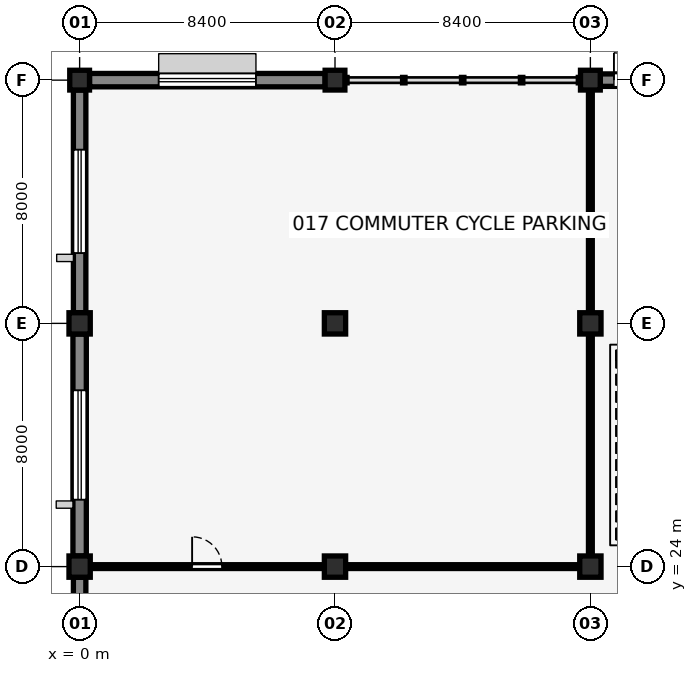
"""IFC4 building model, lengths in metres.
Left out: names, types, materials, properties, quantities, classifications, styles, units other than length and angle.
Written with IfcOpenShell. Run it as: python <this file> out.ifc"""

import sys

from ifc_helpers import new_model, si_unit, direction, frame, frame_2d, origin, origin_2d, place, context, subcontext, project, spatial, rectangle, extrude, element, fill, save


model = new_model("IFC4")
c1 = context("Model", 3, precision=1e-05, world=origin(), true_north=direction((0.0, 1.0)))
c2 = subcontext(c1, "Body", "Model", "MODEL_VIEW")
j1 = project(units=[si_unit("LENGTHUNIT", "METRE"), si_unit("PLANEANGLEUNIT", "RADIAN")], contexts=[c1])
p1 = place(None, origin())
s1 = spatial("IfcSite", under=j1, at=p1, CompositionType="ELEMENT")
p2 = place(p1, origin())
s2 = spatial("IfcBuilding", under=s1, at=p2, CompositionType="ELEMENT")
p3 = place(p2, origin())
s3 = spatial("IfcBuildingStorey", under=s2, at=p3, CompositionType="ELEMENT", Elevation=0.0)
for number, where, z_axis, x_axis in (
    (1, (0.0, 24.0, 0.0), (0.0, 0.0, 1.0), (1.0, 0.0, 0.0)),
    (2, (0.0, 32.0, 0.0), (0.0, 0.0, 1.0), (1.0, 0.0, 0.0)),
):
    element("IfcColumn", number, at=place(p3, frame(where, z_axis=z_axis, x_axis=x_axis)), inside=s3, PredefinedType="COLUMN", context=c2, shape_type="SweptSolid", body=[
        extrude(rectangle(XDim=0.7, YDim=0.7, at=origin_2d()), origin(), (0.0, 0.0, 1.0), 5.15),
    ])
p4 = place(p3, frame((0.0, 40.0, 0.0), z_axis=(0.0, 0.0, 1.0), x_axis=(1.0, 0.0, 0.0)))
e3 = element("IfcColumn", 3, at=p4, inside=s3, PredefinedType="COLUMN", context=c2, shape_type="SweptSolid", body=[
    extrude(rectangle(XDim=0.65, YDim=0.65, at=origin_2d()), origin(), (0.0, 0.0, 1.0), 5.15),
])
for number, where, z_axis, x_axis in (
    (4, (8.4, 24.0, 0.0), (0.0, 0.0, 1.0), (1.0, 0.0, 0.0)),
    (5, (8.4, 32.0, 0.0), (0.0, 0.0, 1.0), (1.0, 0.0, 0.0)),
):
    element("IfcColumn", number, at=place(p3, frame(where, z_axis=z_axis, x_axis=x_axis)), inside=s3, PredefinedType="COLUMN", context=c2, shape_type="SweptSolid", body=[
        extrude(rectangle(XDim=0.7, YDim=0.7, at=origin_2d()), origin(), (0.0, 0.0, 1.0), 5.15),
    ])
p5 = place(p3, frame((8.4, 40.0, 0.0), z_axis=(0.0, 0.0, 1.0), x_axis=(1.0, 0.0, 0.0)))
e6 = element("IfcColumn", 6, at=p5, inside=s3, PredefinedType="COLUMN", context=c2, shape_type="SweptSolid", body=[
    extrude(rectangle(XDim=0.65, YDim=0.65, at=origin_2d()), origin(), (0.0, 0.0, 1.0), 5.15),
])
for number, where, z_axis, x_axis in (
    (7, (16.8, 24.0, 0.0), (0.0, 0.0, 1.0), (1.0, 0.0, 0.0)),
    (8, (16.8, 32.0, 0.0), (0.0, 0.0, 1.0), (1.0, 0.0, 0.0)),
):
    element("IfcColumn", number, at=place(p3, frame(where, z_axis=z_axis, x_axis=x_axis)), inside=s3, PredefinedType="COLUMN", context=c2, shape_type="SweptSolid", body=[
        extrude(rectangle(XDim=0.7, YDim=0.7, at=origin_2d()), origin(), (0.0, 0.0, 1.0), 5.15),
    ])
p6 = place(p3, frame((16.8, 40.0, 0.0), z_axis=(0.0, 0.0, 1.0), x_axis=(1.0, 0.0, 0.0)))
e9 = element("IfcColumn", 9, at=p6, inside=s3, PredefinedType="COLUMN", context=c2, shape_type="SweptSolid", body=[
    extrude(rectangle(XDim=0.65, YDim=0.65, at=origin_2d()), origin(), (0.0, 0.0, 1.0), 5.15),
])
p7 = place(p3, frame((0.0, 16.35, 0.0), z_axis=(0.0, 0.0, 1.0), x_axis=(0.0, 1.0, 0.0)))
e10 = element("IfcWall", 10, at=p7, inside=s3, PredefinedType="SOLIDWALL", context=c2, shape_type="SweptSolid", body=[
    extrude(rectangle(XDim=7.3, YDim=0.41, at=frame_2d((3.65, 0.0))), origin(), (0.0, 0.0, 1.0), 4.85),
])
p8 = place(p3, frame((0.0, 24.35, 0.0), z_axis=(0.0, 0.0, 1.0), x_axis=(0.0, 1.0, 0.0)))
e11 = element("IfcWall", 11, at=p8, inside=s3, PredefinedType="SOLIDWALL", context=c2, shape_type="SweptSolid", body=[
    extrude(rectangle(XDim=7.3, YDim=0.44, at=frame_2d((3.65, 0.0))), origin(), (0.0, 0.0, 1.0), 4.747),
])
p9 = place(p8, frame((1.85, 0.0, 0.9), z_axis=(0.0, 0.0, 1.0), x_axis=(1.0, 0.0, 0.0)))
e12 = element("IfcOpeningElement", 12, at=p9, cuts=e11, PredefinedType="OPENING", context=c2, shape_type="SweptSolid", body=[
    extrude(rectangle(XDim=3.6, YDim=1.8, at=frame_2d((1.8, 0.9))), frame((0.0, 0.23, 0.0), z_axis=(0.0, -1.0, 0.0), x_axis=(1.0, 0.0, 0.0)), (0.0, 0.0, 1.0), 0.46),
])
p10 = place(p3, frame((0.0, 32.35, 0.0), z_axis=(0.0, 0.0, 1.0), x_axis=(0.0, 1.0, 0.0)))
e13 = element("IfcWall", 13, at=p10, inside=s3, PredefinedType="SOLIDWALL", context=c2, shape_type="SweptSolid", body=[
    extrude(rectangle(XDim=7.325, YDim=0.41, at=frame_2d((3.663, 0.0))), origin(), (0.0, 0.0, 1.0), 4.747),
])
p11 = place(p10, frame((1.962, 0.0, 0.9), z_axis=(0.0, 0.0, 1.0), x_axis=(1.0, 0.0, 0.0)))
e14 = element("IfcOpeningElement", 14, at=p11, cuts=e13, PredefinedType="OPENING", context=c2, shape_type="SweptSolid", body=[
    extrude(rectangle(XDim=3.4, YDim=1.7, at=frame_2d((1.7, 0.85))), frame((0.0, 0.215, 0.0), z_axis=(0.0, -1.0, 0.0), x_axis=(1.0, 0.0, 0.0)), (0.0, 0.0, 1.0), 0.43),
])
p12 = place(p3, frame((0.325, 40.0, 0.0), z_axis=(0.0, 0.0, 1.0), x_axis=(1.0, 0.0, 0.0)))
e15 = element("IfcWall", 15, at=p12, inside=s3, PredefinedType="SOLIDWALL", context=c2, shape_type="SweptSolid", body=[
    extrude(rectangle(XDim=7.75, YDim=0.44, at=frame_2d((3.875, 0.0))), origin(), (0.0, 0.0, 1.0), 4.74),
])
p13 = place(p12, frame((2.275, 0.0, 0.9), z_axis=(0.0, 0.0, 1.0), x_axis=(1.0, 0.0, 0.0)))
e16 = element("IfcOpeningElement", 16, at=p13, cuts=e15, PredefinedType="OPENING", context=c2, shape_type="SweptSolid", body=[
    extrude(rectangle(XDim=3.2, YDim=1.65, at=frame_2d((1.6, 0.825))), frame((0.0, 0.23, 0.0), z_axis=(0.0, -1.0, 0.0), x_axis=(1.0, 0.0, 0.0)), (0.0, 0.0, 1.0), 0.46),
])
p14 = place(p3, frame((17.125, 40.0, 0.0), z_axis=(0.0, 0.0, 1.0), x_axis=(1.0, 0.0, 0.0)))
e17 = element("IfcWall", 17, at=p14, inside=s3, PredefinedType="SOLIDWALL", context=c2, shape_type="SweptSolid", body=[
    extrude(rectangle(XDim=7.75, YDim=0.41, at=frame_2d((3.875, 0.0))), origin(), (0.0, 0.0, 1.0), 4.74),
])
p15 = place(p14, frame((0.45, 0.0, 0.0), z_axis=(0.0, 0.0, 1.0), x_axis=(1.0, 0.0, 0.0)))
e18 = element("IfcOpeningElement", 18, at=p15, cuts=e17, PredefinedType="OPENING", context=c2, shape_type="SweptSolid", body=[
    extrude(rectangle(XDim=1.8, YDim=2.2, at=frame_2d((0.9, 1.1))), frame((0.0, 0.215, 0.0), z_axis=(0.0, -1.0, 0.0), x_axis=(1.0, 0.0, 0.0)), (0.0, 0.0, 1.0), 0.43),
])
p16 = place(p3, frame((0.34, 24.0, 0.0), z_axis=(0.0, 0.0, 1.0), x_axis=(1.0, 0.0, 0.0)))
e19 = element("IfcWall", 19, at=p16, inside=s3, PredefinedType="PARTITIONING", context=c2, shape_type="SweptSolid", body=[
    extrude(rectangle(XDim=7.72, YDim=0.125, at=frame_2d((3.86, 0.0))), origin(), (0.0, 0.0, 1.0), 4.533),
])
p17 = place(p16, frame((3.36, 0.0, 0.0), z_axis=(0.0, 0.0, 1.0), x_axis=(1.0, 0.0, 0.0)))
e20 = element("IfcOpeningElement", 20, at=p17, cuts=e19, PredefinedType="OPENING", context=c2, shape_type="SweptSolid", body=[
    extrude(rectangle(XDim=0.98, YDim=2.15, at=frame_2d((0.49, 1.075))), frame((0.0, 0.073, 0.0), z_axis=(0.0, -1.0, 0.0), x_axis=(1.0, 0.0, 0.0)), (0.0, 0.0, 1.0), 0.145),
])
p18 = place(p3, frame((8.74, 24.0, 0.0), z_axis=(0.0, 0.0, 1.0), x_axis=(1.0, 0.0, 0.0)))
e21 = element("IfcWall", 21, at=p18, inside=s3, PredefinedType="PARTITIONING", context=c2, shape_type="SweptSolid", body=[
    extrude(rectangle(XDim=7.72, YDim=0.125, at=frame_2d((3.86, 0.0))), origin(), (0.0, 0.0, 1.0), 4.533),
])
p19 = place(p3, frame((16.8, 24.34, 0.0), z_axis=(0.0, 0.0, 1.0), x_axis=(0.0, 1.0, 0.0)))
e22 = element("IfcWall", 22, at=p19, inside=s3, PredefinedType="PARTITIONING", context=c2, shape_type="SweptSolid", body=[
    extrude(rectangle(XDim=7.32, YDim=0.125, at=frame_2d((3.66, 0.0))), origin(), (0.0, 0.0, 1.0), 4.542),
])
p20 = place(p3, frame((16.8, 32.34, 0.0), z_axis=(0.0, 0.0, 1.0), x_axis=(0.0, 1.0, 0.0)))
e23 = element("IfcWall", 23, at=p20, inside=s3, PredefinedType="PARTITIONING", context=c2, shape_type="SweptSolid", body=[
    extrude(rectangle(XDim=7.345, YDim=0.125, at=frame_2d((3.672, 0.0))), origin(), (0.0, 0.0, 1.0), 4.542),
])
p21 = place(p9, origin())
e24 = element("IfcWindow", 24, at=p21, inside=s3, PartitioningType="TRIPLE_PANEL_VERTICAL", PredefinedType="WINDOW", context=c2, shape_type="SweptSolid", body=[
    extrude(rectangle(XDim=3.6, YDim=1.8, at=frame_2d((1.8, 0.9))), frame((0.0, 0.03, 0.0), z_axis=(0.0, -1.0, 0.0), x_axis=(1.0, 0.0, 0.0)), (0.0, 0.0, 1.0), 0.06),
])
fill(e12, e24)
p22 = place(p11, origin())
e25 = element("IfcWindow", 25, at=p22, inside=s3, PartitioningType="TRIPLE_PANEL_VERTICAL", PredefinedType="WINDOW", context=c2, shape_type="SweptSolid", body=[
    extrude(rectangle(XDim=3.4, YDim=1.7, at=frame_2d((1.7, 0.85))), frame((0.0, 0.03, 0.0), z_axis=(0.0, -1.0, 0.0), x_axis=(1.0, 0.0, 0.0)), (0.0, 0.0, 1.0), 0.06),
])
fill(e14, e25)
p23 = place(p13, origin())
e26 = element("IfcWindow", 26, at=p23, inside=s3, PartitioningType="TRIPLE_PANEL_VERTICAL", PredefinedType="WINDOW", context=c2, shape_type="SweptSolid", body=[
    extrude(rectangle(XDim=3.2, YDim=1.65, at=frame_2d((1.6, 0.825))), frame((0.0, 0.03, 0.0), z_axis=(0.0, -1.0, 0.0), x_axis=(1.0, 0.0, 0.0)), (0.0, 0.0, 1.0), 0.06),
])
fill(e16, e26)
p24 = place(p15, origin())
e27 = element("IfcDoor", 27, at=p24, inside=s3, OperationType="DOUBLE_DOOR_SINGLE_SWING", PredefinedType="DOOR", context=c2, shape_type="SweptSolid", body=[
    extrude(rectangle(XDim=1.8, YDim=2.2, at=frame_2d((0.9, 1.1))), frame((0.0, 0.025, 0.0), z_axis=(0.0, -1.0, 0.0), x_axis=(1.0, 0.0, 0.0)), (0.0, 0.0, 1.0), 0.05),
])
fill(e18, e27)
p25 = place(p17, origin())
e28 = element("IfcDoor", 28, at=p25, inside=s3, OperationType="SINGLE_SWING_LEFT", PredefinedType="DOOR", context=c2, shape_type="SweptSolid", body=[
    extrude(rectangle(XDim=0.98, YDim=2.15, at=frame_2d((0.49, 1.075))), frame((0.0, 0.025, 0.0), z_axis=(0.0, -1.0, 0.0), x_axis=(1.0, 0.0, 0.0)), (0.0, 0.0, 1.0), 0.05),
])
fill(e20, e28)
save(model, sys.argv[1])
